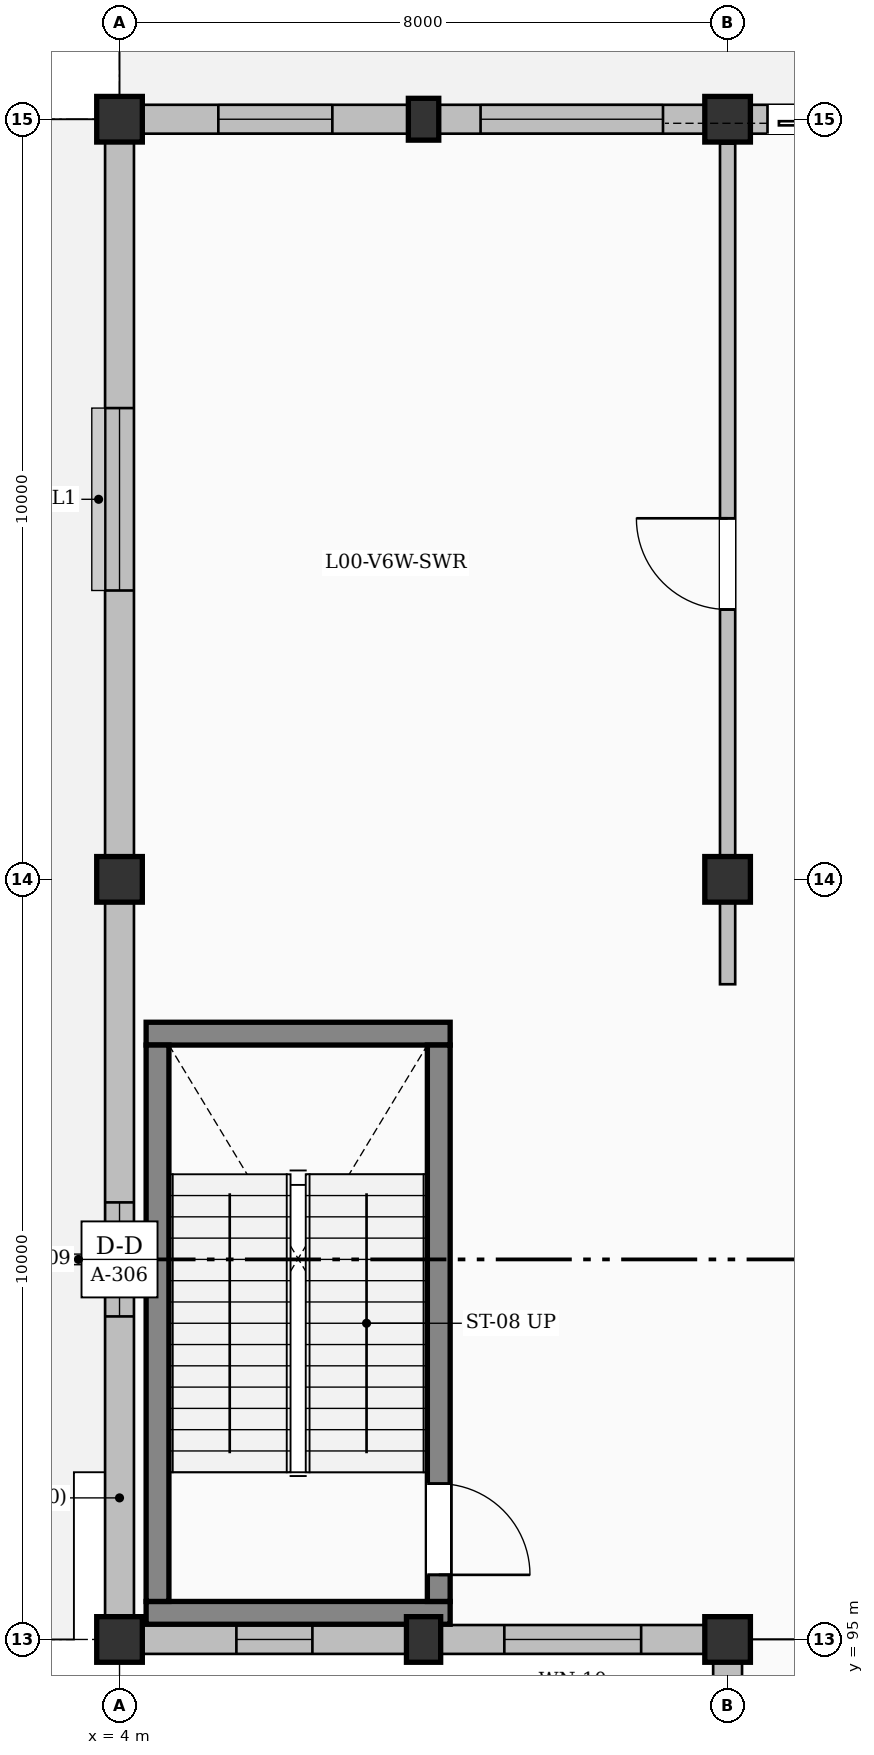
"""IFC4 building model, lengths in metres.
Left out: names, types, materials, properties, quantities, classifications, styles, units other than length and angle.
Written with IfcOpenShell. Run it as: python <this file> out.ifc"""

import sys

from ifc_helpers import new_model, si_unit, direction, frame, frame_2d, origin, origin_2d, place, context, subcontext, project, spatial, rectangle, extrude, element, fill, save


model = new_model("IFC4")
c1 = context("Model", 3, precision=1e-05, world=origin(), true_north=direction((0.0, 1.0)))
c2 = subcontext(c1, "Body", "Model", "MODEL_VIEW")
j1 = project(units=[si_unit("LENGTHUNIT", "METRE"), si_unit("PLANEANGLEUNIT", "RADIAN")], contexts=[c1])
p1 = place(None, origin())
s1 = spatial("IfcSite", under=j1, at=p1, CompositionType="ELEMENT")
p2 = place(p1, origin())
s2 = spatial("IfcBuilding", under=s1, at=p2, CompositionType="ELEMENT")
p3 = place(p2, origin())
s3 = spatial("IfcBuildingStorey", under=s2, at=p3, CompositionType="ELEMENT", Elevation=0.0)
for number, where, z_axis, x_axis in (
    (1, (4.0, 95.0, 0.0), (0.0, 0.0, 1.0), (1.0, 0.0, 0.0)),
    (2, (4.0, 105.0, 0.0), (0.0, 0.0, 1.0), (1.0, 0.0, 0.0)),
    (3, (4.0, 115.0, 0.0), (0.0, 0.0, 1.0), (1.0, 0.0, 0.0)),
):
    element("IfcColumn", number, at=place(p3, frame(where, z_axis=z_axis, x_axis=x_axis)), inside=s3, PredefinedType="COLUMN", context=c2, shape_type="SweptSolid", body=[
        extrude(rectangle(XDim=0.6, YDim=0.6, at=origin_2d()), origin(), (0.0, 0.0, 1.0), 4.8),
    ])
p4 = place(p3, frame((8.0, 95.0, 0.0), z_axis=(0.0, 0.0, 1.0), x_axis=(1.0, 0.0, 0.0)))
e4 = element("IfcColumn", 4, at=p4, inside=s3, PredefinedType="PILASTER", context=c2, shape_type="SweptSolid", body=[
    extrude(rectangle(XDim=0.45, YDim=0.6, at=origin_2d()), origin(), (0.0, 0.0, 1.0), 4.8),
])
p5 = place(p3, frame((8.0, 115.0, 0.0), z_axis=(0.0, 0.0, 1.0), x_axis=(1.0, 0.0, 0.0)))
e5 = element("IfcColumn", 5, at=p5, inside=s3, PredefinedType="PILASTER", context=c2, shape_type="SweptSolid", body=[
    extrude(rectangle(XDim=0.4, YDim=0.55, at=origin_2d()), origin(), (0.0, 0.0, 1.0), 4.8),
])
for number, where, z_axis, x_axis in (
    (6, (12.0, 95.0, 0.0), (0.0, 0.0, 1.0), (1.0, 0.0, 0.0)),
    (7, (12.0, 105.0, 0.0), (0.0, 0.0, 1.0), (1.0, 0.0, 0.0)),
    (8, (12.0, 115.0, 0.0), (0.0, 0.0, 1.0), (1.0, 0.0, 0.0)),
):
    element("IfcColumn", number, at=place(p3, frame(where, z_axis=z_axis, x_axis=x_axis)), inside=s3, PredefinedType="COLUMN", context=c2, shape_type="SweptSolid", body=[
        extrude(rectangle(XDim=0.6, YDim=0.6, at=origin_2d()), origin(), (0.0, 0.0, 1.0), 4.8),
    ])
p6 = place(p3, frame((4.0, 95.3, 0.0), z_axis=(0.0, 0.0, 1.0), x_axis=(0.0, 1.0, 0.0)))
e9 = element("IfcWall", 9, at=p6, inside=s3, PredefinedType="SOLIDWALL", context=c2, shape_type="SweptSolid", body=[
    extrude(rectangle(XDim=9.4, YDim=0.38, at=frame_2d((4.7, 0.0))), origin(), (0.0, 0.0, 1.0), 4.235),
])
p7 = place(p6, frame((3.95, 0.0, 0.95)))
e10 = element("IfcOpeningElement", 10, at=p7, cuts=e9, PredefinedType="OPENING", context=c2, shape_type="SweptSolid", body=[
    extrude(rectangle(XDim=1.5, YDim=1.5, at=frame_2d((0.75, 0.75))), frame((0.0, 0.2, 0.0), z_axis=(0.0, -1.0, 0.0), x_axis=(1.0, 0.0, 0.0)), (0.0, 0.0, 1.0), 0.4),
])
p8 = place(p3, frame((4.0, 105.3, 0.0), z_axis=(0.0, 0.0, 1.0), x_axis=(0.0, 1.0, 0.0)))
e11 = element("IfcWall", 11, at=p8, inside=s3, PredefinedType="SOLIDWALL", context=c2, shape_type="SweptSolid", body=[
    extrude(rectangle(XDim=9.4, YDim=0.38, at=frame_2d((4.7, 0.0))), origin(), (0.0, 0.0, 1.0), 4.335),
])
p9 = place(p8, frame((3.5, 0.0, 0.95)))
e12 = element("IfcOpeningElement", 12, at=p9, cuts=e11, PredefinedType="OPENING", context=c2, shape_type="SweptSolid", body=[
    extrude(rectangle(XDim=2.4, YDim=1.5, at=frame_2d((1.2, 0.75))), frame((0.0, 0.2, 0.0), z_axis=(0.0, -1.0, 0.0), x_axis=(1.0, 0.0, 0.0)), (0.0, 0.0, 1.0), 0.4),
])
p10 = place(p3, frame((4.3, 115.0, 0.0), z_axis=(0.0, 0.0, 1.0), x_axis=(1.0, 0.0, 0.0)))
e13 = element("IfcWall", 13, at=p10, inside=s3, PredefinedType="SOLIDWALL", context=c2, shape_type="SweptSolid", body=[
    extrude(rectangle(XDim=3.5, YDim=0.38, at=frame_2d((1.75, 0.0))), origin(), (0.0, 0.0, 1.0), 3.935),
])
p11 = place(p10, frame((1.0, 0.0, 0.95)))
e14 = element("IfcOpeningElement", 14, at=p11, cuts=e13, PredefinedType="OPENING", context=c2, shape_type="SweptSolid", body=[
    extrude(rectangle(XDim=1.5, YDim=1.5, at=frame_2d((0.75, 0.75))), frame((0.0, 0.2, 0.0), z_axis=(0.0, -1.0, 0.0), x_axis=(1.0, 0.0, 0.0)), (0.0, 0.0, 1.0), 0.4),
])
p12 = place(p3, frame((8.2, 115.0, 0.0), z_axis=(0.0, 0.0, 1.0), x_axis=(1.0, 0.0, 0.0)))
e15 = element("IfcWall", 15, at=p12, inside=s3, PredefinedType="SOLIDWALL", context=c2, shape_type="SweptSolid", body=[
    extrude(rectangle(XDim=3.5, YDim=0.38, at=frame_2d((1.75, 0.0))), origin(), (0.0, 0.0, 1.0), 3.935),
])
p13 = place(p12, frame((0.55, 0.0, 0.95)))
e16 = element("IfcOpeningElement", 16, at=p13, cuts=e15, PredefinedType="OPENING", context=c2, shape_type="SweptSolid", body=[
    extrude(rectangle(XDim=2.4, YDim=1.5, at=frame_2d((1.2, 0.75))), frame((0.0, 0.2, 0.0), z_axis=(0.0, -1.0, 0.0), x_axis=(1.0, 0.0, 0.0)), (0.0, 0.0, 1.0), 0.4),
])
p14 = place(p3, frame((12.3, 115.0, 0.0), z_axis=(0.0, 0.0, 1.0), x_axis=(1.0, 0.0, 0.0)))
e17 = element("IfcWall", 17, at=p14, inside=s3, PredefinedType="SOLIDWALL", context=c2, shape_type="SweptSolid", body=[
    extrude(rectangle(XDim=3.45, YDim=0.38, at=frame_2d((1.725, 0.0))), origin(), (0.0, 0.0, 1.0), 4.235),
])
p15 = place(p14, frame((0.225, 0.0, 0.0)))
e18 = element("IfcOpeningElement", 18, at=p15, cuts=e17, PredefinedType="OPENING", context=c2, shape_type="SweptSolid", body=[
    extrude(rectangle(XDim=3.0, YDim=3.1, at=frame_2d((1.5, 1.55))), frame((0.0, 0.2, 0.0), z_axis=(0.0, -1.0, 0.0), x_axis=(1.0, 0.0, 0.0)), (0.0, 0.0, 1.0), 0.4),
])
p16 = place(p3, frame((11.7, 95.0, 0.0), z_axis=(0.0, 0.0, 1.0), x_axis=(-1.0, 0.0, 0.0)))
e19 = element("IfcWall", 19, at=p16, inside=s3, PredefinedType="SOLIDWALL", context=c2, shape_type="SweptSolid", body=[
    extrude(rectangle(XDim=3.475, YDim=0.38, at=frame_2d((1.737, 0.0))), origin(), (0.0, 0.0, 1.0), 4.035),
])
p17 = place(p16, frame((0.837, 0.0, 0.95)))
e20 = element("IfcOpeningElement", 20, at=p17, cuts=e19, PredefinedType="OPENING", context=c2, shape_type="SweptSolid", body=[
    extrude(rectangle(XDim=1.8, YDim=1.5, at=frame_2d((0.9, 0.75))), frame((0.0, 0.2, 0.0), z_axis=(0.0, -1.0, 0.0), x_axis=(1.0, 0.0, 0.0)), (0.0, 0.0, 1.0), 0.4),
])
p18 = place(p3, frame((7.775, 95.0, 0.0), z_axis=(0.0, 0.0, 1.0), x_axis=(-1.0, 0.0, 0.0)))
e21 = element("IfcWall", 21, at=p18, inside=s3, PredefinedType="SOLIDWALL", context=c2, shape_type="SweptSolid", body=[
    extrude(rectangle(XDim=3.475, YDim=0.38, at=frame_2d((1.737, 0.0))), origin(), (0.0, 0.0, 1.0), 4.035),
])
p19 = place(p18, frame((1.238, 0.0, 0.95)))
e22 = element("IfcOpeningElement", 22, at=p19, cuts=e21, PredefinedType="OPENING", context=c2, shape_type="SweptSolid", body=[
    extrude(rectangle(XDim=1.0, YDim=1.4, at=frame_2d((0.5, 0.7))), frame((0.0, 0.2, 0.0), z_axis=(0.0, -1.0, 0.0), x_axis=(1.0, 0.0, 0.0)), (0.0, 0.0, 1.0), 0.4),
])
p20 = place(p3, frame((12.0, 90.325, 0.0), z_axis=(0.0, 0.0, 1.0), x_axis=(0.0, 1.0, 0.0)))
e23 = element("IfcWall", 23, at=p20, inside=s3, PredefinedType="SOLIDWALL", context=c2, shape_type="SweptSolid", body=[
    extrude(rectangle(XDim=4.375, YDim=0.38, at=frame_2d((2.188, 0.0))), origin(), (0.0, 0.0, 1.0), 3.945),
])
p21 = place(p20, frame((1.538, 0.0, 0.95)))
e24 = element("IfcOpeningElement", 24, at=p21, cuts=e23, PredefinedType="OPENING", context=c2, shape_type="SweptSolid", body=[
    extrude(rectangle(XDim=1.3, YDim=1.4, at=frame_2d((0.65, 0.7))), frame((0.0, 0.2, 0.0), z_axis=(0.0, -1.0, 0.0), x_axis=(1.0, 0.0, 0.0)), (0.0, 0.0, 1.0), 0.4),
])
for number, where, z_axis, x_axis in (
    (25, (4.35, 95.35, 0.0), (0.0, 0.0, 1.0), (1.0, 0.0, 0.0)),
    (26, (8.35, 102.97, 0.0), (0.0, 0.0, 1.0), (-1.0, 0.0, 0.0)),
):
    element("IfcWall", number, at=place(p3, frame(where, z_axis=z_axis, x_axis=x_axis)), inside=s3, PredefinedType="SHEAR", context=c2, shape_type="SweptSolid", body=[
        extrude(rectangle(XDim=4.0, YDim=0.3, at=frame_2d((2.0, 0.0))), origin(), (0.0, 0.0, 1.0), 4.55),
    ])
p22 = place(p3, frame((4.5, 95.5, 0.0), z_axis=(0.0, 0.0, 1.0), x_axis=(0.0, 1.0, 0.0)))
e27 = element("IfcWall", 27, at=p22, inside=s3, PredefinedType="SHEAR", context=c2, shape_type="SweptSolid", body=[
    extrude(rectangle(XDim=7.32, YDim=0.3, at=frame_2d((3.66, 0.0))), origin(), (0.0, 0.0, 1.0), 4.55),
])
p23 = place(p3, frame((8.2, 102.82, 0.0), z_axis=(0.0, 0.0, 1.0), x_axis=(0.0, -1.0, 0.0)))
e28 = element("IfcWall", 28, at=p23, inside=s3, PredefinedType="SHEAR", context=c2, shape_type="SweptSolid", body=[
    extrude(rectangle(XDim=7.32, YDim=0.3, at=frame_2d((3.66, 0.0))), origin(), (0.0, 0.0, 1.0), 4.55),
])
p24 = place(p23, frame((5.77, 0.0, 0.0)))
e29 = element("IfcOpeningElement", 29, at=p24, cuts=e28, PredefinedType="OPENING", context=c2, shape_type="SweptSolid", body=[
    extrude(rectangle(XDim=1.2, YDim=2.15, at=frame_2d((0.6, 1.075))), frame((0.0, 0.16, 0.0), z_axis=(0.0, -1.0, 0.0), x_axis=(1.0, 0.0, 0.0)), (0.0, 0.0, 1.0), 0.32),
])
p25 = place(p3, frame((12.0, 103.62, 0.0), z_axis=(0.0, 0.0, 1.0), x_axis=(0.0, 1.0, 0.0)))
e30 = element("IfcWall", 30, at=p25, inside=s3, PredefinedType="PARTITIONING", context=c2, shape_type="SweptSolid", body=[
    extrude(rectangle(XDim=11.06, YDim=0.2, at=frame_2d((5.53, 0.0))), origin(), (0.0, 0.0, 1.0), 3.585),
])
p26 = place(p25, frame((4.93, 0.0, 0.0)))
e31 = element("IfcOpeningElement", 31, at=p26, cuts=e30, PredefinedType="OPENING", context=c2, shape_type="SweptSolid", body=[
    extrude(rectangle(XDim=1.2, YDim=2.2, at=frame_2d((0.6, 1.1))), frame((0.0, 0.11, 0.0), z_axis=(0.0, -1.0, 0.0), x_axis=(1.0, 0.0, 0.0)), (0.0, 0.0, 1.0), 0.22),
])
p27 = place(p7, origin())
e32 = element("IfcWindow", 32, at=p27, inside=s3, PartitioningType="DOUBLE_PANEL_VERTICAL", PredefinedType="WINDOW", context=c2, shape_type="SweptSolid", body=[
    extrude(rectangle(XDim=1.5, YDim=1.5, at=frame_2d((0.75, 0.75))), frame((0.0, 0.03, 0.0), z_axis=(0.0, -1.0, 0.0), x_axis=(1.0, 0.0, 0.0)), (0.0, 0.0, 1.0), 0.06),
])
fill(e10, e32)
p28 = place(p9, origin())
e33 = element("IfcWindow", 33, at=p28, inside=s3, PartitioningType="TRIPLE_PANEL_VERTICAL", PredefinedType="WINDOW", context=c2, shape_type="SweptSolid", body=[
    extrude(rectangle(XDim=2.4, YDim=1.5, at=frame_2d((1.2, 0.75))), frame((0.0, 0.03, 0.0), z_axis=(0.0, -1.0, 0.0), x_axis=(1.0, 0.0, 0.0)), (0.0, 0.0, 1.0), 0.06),
])
fill(e12, e33)
p29 = place(p11, origin())
e34 = element("IfcWindow", 34, at=p29, inside=s3, PartitioningType="DOUBLE_PANEL_VERTICAL", PredefinedType="WINDOW", context=c2, shape_type="SweptSolid", body=[
    extrude(rectangle(XDim=1.5, YDim=1.5, at=frame_2d((0.75, 0.75))), frame((0.0, 0.03, 0.0), z_axis=(0.0, -1.0, 0.0), x_axis=(1.0, 0.0, 0.0)), (0.0, 0.0, 1.0), 0.06),
])
fill(e14, e34)
p30 = place(p13, origin())
e35 = element("IfcWindow", 35, at=p30, inside=s3, PartitioningType="TRIPLE_PANEL_VERTICAL", PredefinedType="WINDOW", context=c2, shape_type="SweptSolid", body=[
    extrude(rectangle(XDim=2.4, YDim=1.5, at=frame_2d((1.2, 0.75))), frame((0.0, 0.03, 0.0), z_axis=(0.0, -1.0, 0.0), x_axis=(1.0, 0.0, 0.0)), (0.0, 0.0, 1.0), 0.06),
])
fill(e16, e35)
p31 = place(p15, origin())
e36 = element("IfcDoor", 36, at=p31, inside=s3, OperationType="ROLLINGUP", PredefinedType="DOOR", context=c2, shape_type="SweptSolid", body=[
    extrude(rectangle(XDim=3.0, YDim=3.1, at=frame_2d((1.5, 1.55))), frame((0.0, 0.025, 0.0), z_axis=(0.0, -1.0, 0.0), x_axis=(1.0, 0.0, 0.0)), (0.0, 0.0, 1.0), 0.05),
])
fill(e18, e36)
p32 = place(p17, origin())
e37 = element("IfcWindow", 37, at=p32, inside=s3, PartitioningType="DOUBLE_PANEL_VERTICAL", PredefinedType="WINDOW", context=c2, shape_type="SweptSolid", body=[
    extrude(rectangle(XDim=1.8, YDim=1.5, at=frame_2d((0.9, 0.75))), frame((0.0, 0.03, 0.0), z_axis=(0.0, -1.0, 0.0), x_axis=(1.0, 0.0, 0.0)), (0.0, 0.0, 1.0), 0.06),
])
fill(e20, e37)
p33 = place(p19, origin())
e38 = element("IfcWindow", 38, at=p33, inside=s3, PartitioningType="SINGLE_PANEL", PredefinedType="WINDOW", context=c2, shape_type="SweptSolid", body=[
    extrude(rectangle(XDim=1.0, YDim=1.4, at=frame_2d((0.5, 0.7))), frame((0.0, 0.03, 0.0), z_axis=(0.0, -1.0, 0.0), x_axis=(1.0, 0.0, 0.0)), (0.0, 0.0, 1.0), 0.06),
])
fill(e22, e38)
p34 = place(p24, origin())
e39 = element("IfcDoor", 39, at=p34, inside=s3, OperationType="SINGLE_SWING_RIGHT", PredefinedType="DOOR", context=c2, shape_type="SweptSolid", body=[
    extrude(rectangle(XDim=1.2, YDim=2.15, at=frame_2d((0.6, 1.075))), frame((0.0, 0.025, 0.0), z_axis=(0.0, -1.0, 0.0), x_axis=(1.0, 0.0, 0.0)), (0.0, 0.0, 1.0), 0.05),
])
fill(e29, e39)
p35 = place(p26, origin())
e40 = element("IfcDoor", 40, at=p35, inside=s3, OperationType="SINGLE_SWING_RIGHT", PredefinedType="DOOR", context=c2, shape_type="SweptSolid", body=[
    extrude(rectangle(XDim=1.2, YDim=2.2, at=frame_2d((0.6, 1.1))), frame((0.0, 0.025, 0.0), z_axis=(0.0, -1.0, 0.0), x_axis=(1.0, 0.0, 0.0)), (0.0, 0.0, 1.0), 0.05),
])
fill(e31, e40)
save(model, sys.argv[1])
